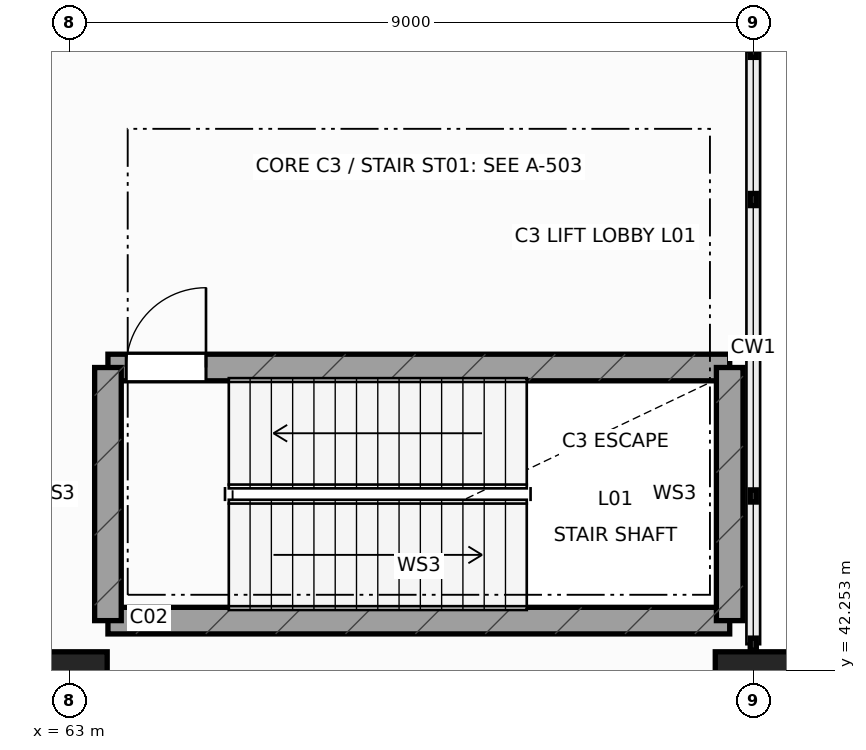
"""IFC4 building model, lengths in metres.
Left out: names, types, materials, properties, quantities, classifications, styles, units other than length and angle.
Written with IfcOpenShell. Run it as: python <this file> out.ifc"""

import sys

from ifc_helpers import new_model, si_unit, direction, frame, frame_2d, origin, origin_2d, place, context, subcontext, project, spatial, rectangle, extrude, element, fill, save


model = new_model("IFC4")
c1 = context("Model", 3, precision=1e-05, world=origin(), true_north=direction((0.0, 1.0)))
c2 = subcontext(c1, "Body", "Model", "MODEL_VIEW")
j1 = project(units=[si_unit("LENGTHUNIT", "METRE"), si_unit("PLANEANGLEUNIT", "RADIAN")], contexts=[c1])
p1 = place(None, origin())
s1 = spatial("IfcSite", under=j1, at=p1, CompositionType="ELEMENT")
p2 = place(p1, origin())
s2 = spatial("IfcBuilding", under=s1, at=p2, CompositionType="ELEMENT")
p3 = place(p2, frame((0.0, 0.0, 6.0)))
s3 = spatial("IfcBuildingStorey", under=s2, at=p3, CompositionType="ELEMENT", Elevation=6.0)
for number, where, z_axis, x_axis in (
    (1, (63.0, 42.0, 0.0), (0.0, 0.0, 1.0), (1.0, 0.0, 0.0)),
    (2, (72.0, 42.0, 0.0), (0.0, 0.0, 1.0), (1.0, 0.0, 0.0)),
):
    element("IfcColumn", number, at=place(p3, frame(where, z_axis=z_axis, x_axis=x_axis)), inside=s3, PredefinedType="COLUMN", context=c2, shape_type="SweptSolid", body=[
        extrude(rectangle(XDim=1.0, YDim=1.0, at=origin_2d()), origin(), (0.0, 0.0, 1.0), 5.4),
    ])
p4 = place(p3, frame((63.51, 42.91, 0.0), z_axis=(0.0, 0.0, 1.0), x_axis=(1.0, 0.0, 0.0)))
e3 = element("IfcWall", 3, at=p4, inside=s3, PredefinedType="SHEAR", context=c2, shape_type="SweptSolid", body=[
    extrude(rectangle(XDim=8.18, YDim=0.35, at=frame_2d((4.09, 0.0))), origin(), (0.0, 0.0, 1.0), 5.05),
])
p5 = place(p3, frame((63.51, 46.24, 0.0), z_axis=(0.0, 0.0, 1.0), x_axis=(1.0, 0.0, 0.0)))
e4 = element("IfcWall", 4, at=p5, inside=s3, PredefinedType="SHEAR", context=c2, shape_type="SweptSolid", body=[
    extrude(rectangle(XDim=8.18, YDim=0.35, at=frame_2d((4.09, 0.0))), origin(), (0.0, 0.0, 1.0), 5.05),
])
p6 = place(p5, frame((0.24, 0.0, 0.0)))
e5 = element("IfcOpeningElement", 5, at=p6, cuts=e4, PredefinedType="OPENING", context=c2, shape_type="SweptSolid", body=[
    extrude(rectangle(XDim=1.05, YDim=2.18, at=frame_2d((0.525, 1.09))), frame((0.0, 0.185, 0.0), z_axis=(0.0, -1.0, 0.0), x_axis=(1.0, 0.0, 0.0)), (0.0, 0.0, 1.0), 0.37),
])
for number, where, z_axis, x_axis in (
    (6, (63.51, 42.91, 0.0), (0.0, 0.0, 1.0), (0.0, 1.0, 0.0)),
    (7, (71.69, 42.91, 0.0), (0.0, 0.0, 1.0), (0.0, 1.0, 0.0)),
):
    element("IfcWall", number, at=place(p3, frame(where, z_axis=z_axis, x_axis=x_axis)), inside=s3, PredefinedType="SHEAR", context=c2, shape_type="SweptSolid", body=[
        extrude(rectangle(XDim=3.33, YDim=0.35, at=frame_2d((1.665, 0.0))), origin(), (0.0, 0.0, 1.0), 5.05),
    ])
p7 = place(p6, origin())
e8 = element("IfcDoor", 8, at=p7, inside=s3, OperationType="SINGLE_SWING_RIGHT", PredefinedType="DOOR", context=c2, shape_type="SweptSolid", body=[
    extrude(rectangle(XDim=1.05, YDim=2.18, at=frame_2d((0.525, 1.09))), frame((0.0, 0.025, 0.0), z_axis=(0.0, -1.0, 0.0), x_axis=(1.0, 0.0, 0.0)), (0.0, 0.0, 1.0), 0.05),
])
fill(e5, e8)
save(model, sys.argv[1])
